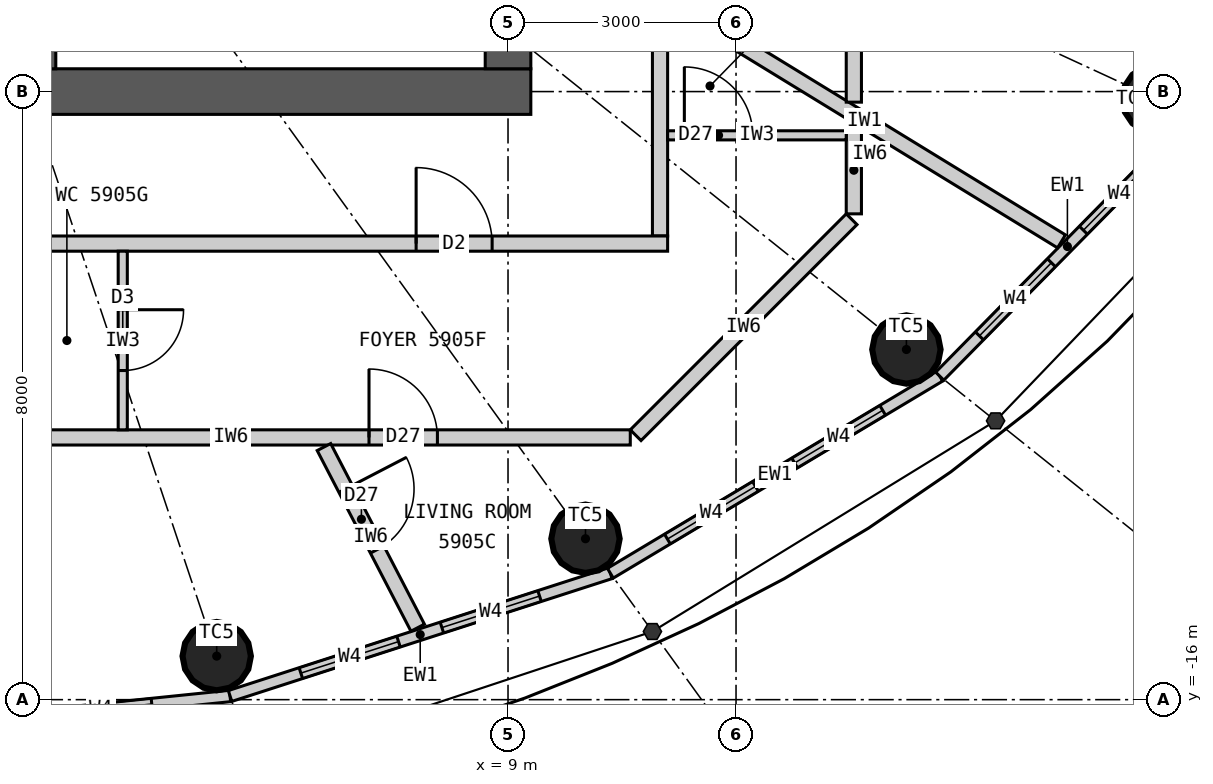
"""IFC4 building model, lengths in metres.
Left out: names, types, materials, properties, quantities, classifications, styles, units other than length and angle.
Written with IfcOpenShell. Run it as: python <this file> out.ifc"""

import sys

from ifc_helpers import new_model, si_unit, direction, frame, frame_2d, origin, origin_2d, place, context, subcontext, project, spatial, rectangle, circle, extrude, element, fill, save


model = new_model("IFC4")
c1 = context("Model", 3, precision=1e-05, world=origin(), true_north=direction((0.0, 1.0)))
c2 = subcontext(c1, "Body", "Model", "MODEL_VIEW")
j1 = project(units=[si_unit("LENGTHUNIT", "METRE"), si_unit("PLANEANGLEUNIT", "RADIAN")], contexts=[c1])
p1 = place(None, origin())
s1 = spatial("IfcSite", under=j1, at=p1, CompositionType="ELEMENT")
p2 = place(p1, origin())
s2 = spatial("IfcBuilding", under=s1, at=p2, CompositionType="ELEMENT")
p3 = place(p2, frame((0.0, 0.0, 219.3)))
s3 = spatial("IfcBuildingStorey", under=s2, at=p3, CompositionType="ELEMENT", Elevation=219.3)
for number, where, z_axis, x_axis in (
    (1, (5.167, -15.427, 0.0), (0.0, 0.0, 1.0), (1.0, 0.0, 0.0)),
    (2, (10.019, -13.883, 0.0), (0.0, 0.0, 1.0), (1.0, 0.0, 0.0)),
    (3, (14.241, -11.393, 0.0), (0.0, 0.0, 1.0), (1.0, 0.0, 0.0)),
    (4, (17.532, -8.098, 0.0), (0.0, 0.0, 1.0), (1.0, 0.0, 0.0)),
):
    element("IfcColumn", number, at=place(p3, frame(where, z_axis=z_axis, x_axis=x_axis)), inside=s3, PredefinedType="COLUMN", context=c2, shape_type="SweptSolid", body=[
        extrude(circle(Radius=0.45, at=origin_2d()), origin(), (0.0, 0.0, 1.0), 3.3),
    ])
p4 = place(p3, frame((9.3, -8.0, 0.0), z_axis=(0.0, 0.0, 1.0), x_axis=(-1.0, 0.0, 0.0)))
e5 = element("IfcWall", 5, at=p4, inside=s3, PredefinedType="SHEAR", context=c2, shape_type="SweptSolid", body=[
    extrude(rectangle(XDim=18.6, YDim=0.6, at=frame_2d((9.3, 0.0))), origin(), (0.0, 0.0, 1.0), 3.3),
])
p5 = place(p4, frame((8.0, 0.0, 0.0)))
e6 = element("IfcOpeningElement", 6, at=p5, cuts=e5, PredefinedType="OPENING", context=c2, shape_type="SweptSolid", body=[
    extrude(rectangle(XDim=1.2, YDim=2.2, at=frame_2d((0.6, 1.1))), frame((0.0, 0.31, 0.0), z_axis=(0.0, -1.0, 0.0), x_axis=(1.0, 0.0, 0.0)), (0.0, 0.0, 1.0), 0.62),
])
p6 = place(p4, frame((15.6, 0.0, 0.0)))
e7 = element("IfcOpeningElement", 7, at=p6, cuts=e5, PredefinedType="OPENING", context=c2, shape_type="SweptSolid", body=[
    extrude(rectangle(XDim=0.9, YDim=2.2, at=frame_2d((0.45, 1.1))), frame((0.0, 0.31, 0.0), z_axis=(0.0, -1.0, 0.0), x_axis=(1.0, 0.0, 0.0)), (0.0, 0.0, 1.0), 0.62),
])
p7 = place(p3, frame((9.0, -7.7, 0.0), z_axis=(0.0, 0.0, 1.0), x_axis=(0.0, 1.0, 0.0)))
e8 = element("IfcWall", 8, at=p7, inside=s3, PredefinedType="SHEAR", context=c2, shape_type="SweptSolid", body=[
    extrude(rectangle(XDim=15.4, YDim=0.6, at=frame_2d((7.7, 0.0))), origin(), (0.0, 0.0, 1.0), 3.3),
])
p8 = place(p7, frame((6.8, 0.0, 0.0)))
e9 = element("IfcOpeningElement", 9, at=p8, cuts=e8, PredefinedType="OPENING", context=c2, shape_type="SweptSolid", body=[
    extrude(rectangle(XDim=1.8, YDim=2.2, at=frame_2d((0.9, 1.1))), frame((0.0, 0.31, 0.0), z_axis=(0.0, -1.0, 0.0), x_axis=(1.0, 0.0, 0.0)), (0.0, 0.0, 1.0), 0.62),
])
p9 = place(p3, frame((2.75, -7.7, 0.0), z_axis=(0.0, 0.0, 1.0), x_axis=(0.0, 1.0, 0.0)))
e10 = element("IfcWall", 10, at=p9, inside=s3, PredefinedType="SHEAR", context=c2, shape_type="SweptSolid", body=[
    extrude(rectangle(XDim=3.2, YDim=0.6, at=frame_2d((1.6, 0.0))), origin(), (0.0, 0.0, 1.0), 3.3),
])
p10 = place(p9, frame((1.175, 0.0, 0.0)))
e11 = element("IfcOpeningElement", 11, at=p10, cuts=e10, PredefinedType="OPENING", context=c2, shape_type="SweptSolid", body=[
    extrude(rectangle(XDim=1.1, YDim=2.2, at=frame_2d((0.55, 1.1))), frame((0.0, 0.31, 0.0), z_axis=(0.0, -1.0, 0.0), x_axis=(1.0, 0.0, 0.0)), (0.0, 0.0, 1.0), 0.62),
])
p11 = place(p3, frame((0.0, -16.5, 0.0), z_axis=(0.0, 0.0, 1.0), x_axis=(0.994774574972, 0.102095763818, 0.0)))
e12 = element("IfcWall", 12, at=p11, inside=s3, PredefinedType="ELEMENTEDWALL", context=c2, shape_type="SweptSolid", body=[
    extrude(rectangle(XDim=5.371, YDim=0.15, at=frame_2d((2.686, 0.0))), origin(), (0.0, 0.0, 1.0), 3.12),
])
p12 = place(p11, frame((1.035, 0.0, 0.9)))
e13 = element("IfcOpeningElement", 13, at=p12, cuts=e12, PredefinedType="OPENING", context=c2, shape_type="SweptSolid", body=[
    extrude(rectangle(XDim=1.35, YDim=1.9, at=frame_2d((0.675, 0.95))), frame((0.0, 0.085, 0.0), z_axis=(0.0, -1.0, 0.0), x_axis=(1.0, 0.0, 0.0)), (0.0, 0.0, 1.0), 0.17),
])
p13 = place(p11, frame((2.985, 0.0, 0.9)))
e14 = element("IfcOpeningElement", 14, at=p13, cuts=e12, PredefinedType="OPENING", context=c2, shape_type="SweptSolid", body=[
    extrude(rectangle(XDim=1.35, YDim=1.9, at=frame_2d((0.675, 0.95))), frame((0.0, 0.085, 0.0), z_axis=(0.0, -1.0, 0.0), x_axis=(1.0, 0.0, 0.0)), (0.0, 0.0, 1.0), 0.17),
])
p14 = place(p3, frame((5.343, -15.952, 0.0), z_axis=(0.0, 0.0, 1.0), x_axis=(0.951644702515, 0.307200846638, 0.0)))
e15 = element("IfcWall", 15, at=p14, inside=s3, PredefinedType="ELEMENTEDWALL", context=c2, shape_type="SweptSolid", body=[
    extrude(rectangle(XDim=5.258, YDim=0.15, at=frame_2d((2.629, 0.0))), origin(), (0.0, 0.0, 1.0), 3.12),
])
p15 = place(p14, frame((0.979, 0.0, 0.9)))
e16 = element("IfcOpeningElement", 16, at=p15, cuts=e15, PredefinedType="OPENING", context=c2, shape_type="SweptSolid", body=[
    extrude(rectangle(XDim=1.35, YDim=1.9, at=frame_2d((0.675, 0.95))), frame((0.0, 0.085, 0.0), z_axis=(0.0, -1.0, 0.0), x_axis=(1.0, 0.0, 0.0)), (0.0, 0.0, 1.0), 0.17),
])
p16 = place(p14, frame((2.929, 0.0, 0.9)))
e17 = element("IfcOpeningElement", 17, at=p16, cuts=e15, PredefinedType="OPENING", context=c2, shape_type="SweptSolid", body=[
    extrude(rectangle(XDim=1.35, YDim=1.9, at=frame_2d((0.675, 0.95))), frame((0.0, 0.085, 0.0), z_axis=(0.0, -1.0, 0.0), x_axis=(1.0, 0.0, 0.0)), (0.0, 0.0, 1.0), 0.17),
])
p17 = place(p3, frame((10.346, -14.336, 0.0), z_axis=(0.0, 0.0, 1.0), x_axis=(0.85822150553, 0.513279502265, 0.0)))
e18 = element("IfcWall", 18, at=p17, inside=s3, PredefinedType="ELEMENTEDWALL", context=c2, shape_type="SweptSolid", body=[
    extrude(rectangle(XDim=5.05, YDim=0.15, at=frame_2d((2.525, 0.0))), origin(), (0.0, 0.0, 1.0), 3.12),
])
p18 = place(p17, frame((0.875, 0.0, 0.9)))
e19 = element("IfcOpeningElement", 19, at=p18, cuts=e18, PredefinedType="OPENING", context=c2, shape_type="SweptSolid", body=[
    extrude(rectangle(XDim=1.35, YDim=1.9, at=frame_2d((0.675, 0.95))), frame((0.0, 0.085, 0.0), z_axis=(0.0, -1.0, 0.0), x_axis=(1.0, 0.0, 0.0)), (0.0, 0.0, 1.0), 0.17),
])
p19 = place(p17, frame((2.825, 0.0, 0.9)))
e20 = element("IfcOpeningElement", 20, at=p19, cuts=e18, PredefinedType="OPENING", context=c2, shape_type="SweptSolid", body=[
    extrude(rectangle(XDim=1.35, YDim=1.9, at=frame_2d((0.675, 0.95))), frame((0.0, 0.085, 0.0), z_axis=(0.0, -1.0, 0.0), x_axis=(1.0, 0.0, 0.0)), (0.0, 0.0, 1.0), 0.17),
])
p20 = place(p3, frame((14.68, -11.744, 0.0), z_axis=(0.0, 0.0, 1.0), x_axis=(0.701527379618, 0.712642501993, 0.0)))
e21 = element("IfcWall", 21, at=p20, inside=s3, PredefinedType="ELEMENTEDWALL", context=c2, shape_type="SweptSolid", body=[
    extrude(rectangle(XDim=4.788, YDim=0.15, at=frame_2d((2.394, 0.0))), origin(), (0.0, 0.0, 1.0), 3.12),
])
p21 = place(p20, frame((0.744, 0.0, 0.9)))
e22 = element("IfcOpeningElement", 22, at=p21, cuts=e21, PredefinedType="OPENING", context=c2, shape_type="SweptSolid", body=[
    extrude(rectangle(XDim=1.35, YDim=1.9, at=frame_2d((0.675, 0.95))), frame((0.0, 0.085, 0.0), z_axis=(0.0, -1.0, 0.0), x_axis=(1.0, 0.0, 0.0)), (0.0, 0.0, 1.0), 0.17),
])
p22 = place(p20, frame((2.694, 0.0, 0.9)))
e23 = element("IfcOpeningElement", 23, at=p22, cuts=e21, PredefinedType="OPENING", context=c2, shape_type="SweptSolid", body=[
    extrude(rectangle(XDim=1.35, YDim=1.9, at=frame_2d((0.675, 0.95))), frame((0.0, 0.085, 0.0), z_axis=(0.0, -1.0, 0.0), x_axis=(1.0, 0.0, 0.0)), (0.0, 0.0, 1.0), 0.17),
])
p23 = place(p3, frame((11.0, -9.9, 0.0), z_axis=(0.0, 0.0, 1.0), x_axis=(0.0, 1.0, 0.0)))
e24 = element("IfcWall", 24, at=p23, inside=s3, PredefinedType="PARTITIONING", context=c2, shape_type="SweptSolid", body=[
    extrude(rectangle(XDim=7.416, YDim=0.2, at=frame_2d((3.708, 0.0))), origin(), (0.0, 0.0, 1.0), 3.12),
])
p24 = place(p3, frame((11.1, -10.0, 0.0), z_axis=(0.0, 0.0, 1.0), x_axis=(-1.0, 0.0, 0.0)))
e25 = element("IfcWall", 25, at=p24, inside=s3, PredefinedType="PARTITIONING", context=c2, shape_type="SweptSolid", body=[
    extrude(rectangle(XDim=22.2, YDim=0.2, at=frame_2d((11.1, 0.0))), origin(), (0.0, 0.0, 1.0), 3.12),
])
p25 = place(p24, frame((18.864, 0.0, 0.0)))
e26 = element("IfcOpeningElement", 26, at=p25, cuts=e25, PredefinedType="OPENING", context=c2, shape_type="SweptSolid", body=[
    extrude(rectangle(XDim=1.0, YDim=2.2, at=frame_2d((0.5, 1.1))), frame((0.0, 0.11, 0.0), z_axis=(0.0, -1.0, 0.0), x_axis=(1.0, 0.0, 0.0)), (0.0, 0.0, 1.0), 0.22),
])
p26 = place(p24, frame((2.309, 0.0, 0.0)))
e27 = element("IfcOpeningElement", 27, at=p26, cuts=e25, PredefinedType="OPENING", context=c2, shape_type="SweptSolid", body=[
    extrude(rectangle(XDim=1.0, YDim=2.2, at=frame_2d((0.5, 1.1))), frame((0.0, 0.11, 0.0), z_axis=(0.0, -1.0, 0.0), x_axis=(1.0, 0.0, 0.0)), (0.0, 0.0, 1.0), 0.22),
])
p27 = place(p3, frame((11.1, -6.797, 0.0), z_axis=(0.0, 0.0, 1.0), x_axis=(0.852799818179, -0.522237943963, 0.0)))
e28 = element("IfcWall", 28, at=p27, inside=s3, PredefinedType="PARTITIONING", context=c2, shape_type="SweptSolid", body=[
    extrude(rectangle(XDim=6.077, YDim=0.2, at=frame_2d((3.039, 0.0))), origin(), (0.0, 0.0, 1.0), 3.12),
])
p28 = place(p3, frame((0.101, -12.55, 0.0), z_axis=(0.0, 0.0, 1.0), x_axis=(1.0, 0.0, 0.0)))
e29 = element("IfcWall", 29, at=p28, inside=s3, PredefinedType="PARTITIONING", context=c2, shape_type="SweptSolid", body=[
    extrude(rectangle(XDim=10.508, YDim=0.2, at=frame_2d((5.254, 0.0))), origin(), (0.0, 0.0, 1.0), 3.12),
])
p29 = place(p28, frame((1.4, 0.0, 0.0)))
e30 = element("IfcOpeningElement", 30, at=p29, cuts=e29, PredefinedType="OPENING", context=c2, shape_type="SweptSolid", body=[
    extrude(rectangle(XDim=0.8, YDim=2.1, at=frame_2d((0.4, 1.05))), frame((0.0, 0.11, 0.0), z_axis=(0.0, -1.0, 0.0), x_axis=(1.0, 0.0, 0.0)), (0.0, 0.0, 1.0), 0.22),
])
p30 = place(p28, frame((7.07, 0.0, 0.0)))
e31 = element("IfcOpeningElement", 31, at=p30, cuts=e29, PredefinedType="OPENING", context=c2, shape_type="SweptSolid", body=[
    extrude(rectangle(XDim=0.9, YDim=2.1, at=frame_2d((0.45, 1.05))), frame((0.0, 0.11, 0.0), z_axis=(0.0, -1.0, 0.0), x_axis=(1.0, 0.0, 0.0)), (0.0, 0.0, 1.0), 0.22),
])
p31 = place(p3, frame((10.679, -12.521, 0.0), z_axis=(0.0, 0.0, 1.0), x_axis=(0.707106781187, 0.707106781187, 0.0)))
e32 = element("IfcWall", 32, at=p31, inside=s3, PredefinedType="PARTITIONING", context=c2, shape_type="SweptSolid", body=[
    extrude(rectangle(XDim=4.019, YDim=0.2, at=frame_2d((2.009, 0.0))), origin(), (0.0, 0.0, 1.0), 3.12),
])
p32 = place(p3, frame((13.55, -9.609, 0.0), z_axis=(0.0, 0.0, 1.0), x_axis=(0.0, 1.0, 0.0)))
e33 = element("IfcWall", 33, at=p32, inside=s3, PredefinedType="PARTITIONING", context=c2, shape_type="SweptSolid", body=[
    extrude(rectangle(XDim=1.148, YDim=0.2, at=frame_2d((0.574, 0.0))), origin(), (0.0, 0.0, 1.0), 3.12),
])
p33 = place(p3, frame((6.578, -12.677, 0.0), z_axis=(0.0, 0.0, 1.0), x_axis=(0.460620531465, -0.887597164255, 0.0)))
e34 = element("IfcWall", 34, at=p33, inside=s3, PredefinedType="PARTITIONING", context=c2, shape_type="SweptSolid", body=[
    extrude(rectangle(XDim=2.678, YDim=0.2, at=frame_2d((1.339, 0.0))), origin(), (0.0, 0.0, 1.0), 3.12),
])
p34 = place(p33, frame((0.62, 0.0, 0.0)))
e35 = element("IfcOpeningElement", 35, at=p34, cuts=e34, PredefinedType="OPENING", context=c2, shape_type="SweptSolid", body=[
    extrude(rectangle(XDim=0.9, YDim=2.1, at=frame_2d((0.45, 1.05))), frame((0.0, 0.11, 0.0), z_axis=(0.0, -1.0, 0.0), x_axis=(1.0, 0.0, 0.0)), (0.0, 0.0, 1.0), 0.22),
])
p35 = place(p3, frame((3.931, -10.1, 0.0), z_axis=(0.0, 0.0, 1.0), x_axis=(0.0, -1.0, 0.0)))
e36 = element("IfcWall", 36, at=p35, inside=s3, PredefinedType="PARTITIONING", context=c2, shape_type="SweptSolid", body=[
    extrude(rectangle(XDim=2.35, YDim=0.12, at=frame_2d((1.175, 0.0))), origin(), (0.0, 0.0, 1.0), 3.12),
])
p36 = place(p35, frame((0.77, 0.0, 0.0)))
e37 = element("IfcOpeningElement", 37, at=p36, cuts=e36, PredefinedType="OPENING", context=c2, shape_type="SweptSolid", body=[
    extrude(rectangle(XDim=0.8, YDim=2.1, at=frame_2d((0.4, 1.05))), frame((0.0, 0.07, 0.0), z_axis=(0.0, -1.0, 0.0), x_axis=(1.0, 0.0, 0.0)), (0.0, 0.0, 1.0), 0.14),
])
p37 = place(p3, frame((11.1, -8.576, 0.0), z_axis=(0.0, 0.0, 1.0), x_axis=(1.0, 0.0, 0.0)))
e38 = element("IfcWall", 38, at=p37, inside=s3, PredefinedType="PARTITIONING", context=c2, shape_type="SweptSolid", body=[
    extrude(rectangle(XDim=2.35, YDim=0.12, at=frame_2d((1.175, 0.0))), origin(), (0.0, 0.0, 1.0), 3.12),
])
p38 = place(p37, frame((0.22, 0.0, 0.0)))
e39 = element("IfcOpeningElement", 39, at=p38, cuts=e38, PredefinedType="OPENING", context=c2, shape_type="SweptSolid", body=[
    extrude(rectangle(XDim=0.9, YDim=2.1, at=frame_2d((0.45, 1.05))), frame((0.0, 0.07, 0.0), z_axis=(0.0, -1.0, 0.0), x_axis=(1.0, 0.0, 0.0)), (0.0, 0.0, 1.0), 0.14),
])
p39 = place(p3, frame((13.55, -8.139, 0.0), z_axis=(0.0, 0.0, 1.0), x_axis=(0.0, 1.0, 0.0)))
e40 = element("IfcWall", 40, at=p39, inside=s3, PredefinedType="PARTITIONING", context=c2, shape_type="SweptSolid", body=[
    extrude(rectangle(XDim=12.496, YDim=0.2, at=frame_2d((6.248, 0.0))), origin(), (0.0, 0.0, 1.0), 3.12),
])
p40 = place(p39, frame((2.42, 0.0, 0.0)))
e41 = element("IfcOpeningElement", 41, at=p40, cuts=e40, PredefinedType="OPENING", context=c2, shape_type="SweptSolid", body=[
    extrude(rectangle(XDim=0.8, YDim=2.1, at=frame_2d((0.4, 1.05))), frame((0.0, 0.11, 0.0), z_axis=(0.0, -1.0, 0.0), x_axis=(1.0, 0.0, 0.0)), (0.0, 0.0, 1.0), 0.22),
])
p41 = place(p39, frame((9.776, 0.0, 0.0)))
e42 = element("IfcOpeningElement", 42, at=p41, cuts=e40, PredefinedType="OPENING", context=c2, shape_type="SweptSolid", body=[
    extrude(rectangle(XDim=0.8, YDim=2.1, at=frame_2d((0.4, 1.05))), frame((0.0, 0.11, 0.0), z_axis=(0.0, -1.0, 0.0), x_axis=(1.0, 0.0, 0.0)), (0.0, 0.0, 1.0), 0.22),
])
p42 = place(p39, frame((5.82, 0.0, 0.0)))
e43 = element("IfcOpeningElement", 43, at=p42, cuts=e40, PredefinedType="OPENING", context=c2, shape_type="SweptSolid", body=[
    extrude(rectangle(XDim=0.9, YDim=2.1, at=frame_2d((0.45, 1.05))), frame((0.0, 0.11, 0.0), z_axis=(0.0, -1.0, 0.0), x_axis=(1.0, 0.0, 0.0)), (0.0, 0.0, 1.0), 0.22),
])
p43 = place(p13, origin())
e44 = element("IfcWindow", 44, at=p43, inside=s3, PartitioningType="SINGLE_PANEL", PredefinedType="WINDOW", context=c2, shape_type="SweptSolid", body=[
    extrude(rectangle(XDim=1.35, YDim=1.9, at=frame_2d((0.675, 0.95))), frame((0.0, 0.03, 0.0), z_axis=(0.0, -1.0, 0.0), x_axis=(1.0, 0.0, 0.0)), (0.0, 0.0, 1.0), 0.06),
])
fill(e14, e44)
p44 = place(p15, origin())
e45 = element("IfcWindow", 45, at=p44, inside=s3, PartitioningType="SINGLE_PANEL", PredefinedType="WINDOW", context=c2, shape_type="SweptSolid", body=[
    extrude(rectangle(XDim=1.35, YDim=1.9, at=frame_2d((0.675, 0.95))), frame((0.0, 0.03, 0.0), z_axis=(0.0, -1.0, 0.0), x_axis=(1.0, 0.0, 0.0)), (0.0, 0.0, 1.0), 0.06),
])
fill(e16, e45)
p45 = place(p16, origin())
e46 = element("IfcWindow", 46, at=p45, inside=s3, PartitioningType="SINGLE_PANEL", PredefinedType="WINDOW", context=c2, shape_type="SweptSolid", body=[
    extrude(rectangle(XDim=1.35, YDim=1.9, at=frame_2d((0.675, 0.95))), frame((0.0, 0.03, 0.0), z_axis=(0.0, -1.0, 0.0), x_axis=(1.0, 0.0, 0.0)), (0.0, 0.0, 1.0), 0.06),
])
fill(e17, e46)
p46 = place(p18, origin())
e47 = element("IfcWindow", 47, at=p46, inside=s3, PartitioningType="SINGLE_PANEL", PredefinedType="WINDOW", context=c2, shape_type="SweptSolid", body=[
    extrude(rectangle(XDim=1.35, YDim=1.9, at=frame_2d((0.675, 0.95))), frame((0.0, 0.03, 0.0), z_axis=(0.0, -1.0, 0.0), x_axis=(1.0, 0.0, 0.0)), (0.0, 0.0, 1.0), 0.06),
])
fill(e19, e47)
p47 = place(p19, origin())
e48 = element("IfcWindow", 48, at=p47, inside=s3, PartitioningType="SINGLE_PANEL", PredefinedType="WINDOW", context=c2, shape_type="SweptSolid", body=[
    extrude(rectangle(XDim=1.35, YDim=1.9, at=frame_2d((0.675, 0.95))), frame((0.0, 0.03, 0.0), z_axis=(0.0, -1.0, 0.0), x_axis=(1.0, 0.0, 0.0)), (0.0, 0.0, 1.0), 0.06),
])
fill(e20, e48)
p48 = place(p21, origin())
e49 = element("IfcWindow", 49, at=p48, inside=s3, PartitioningType="SINGLE_PANEL", PredefinedType="WINDOW", context=c2, shape_type="SweptSolid", body=[
    extrude(rectangle(XDim=1.35, YDim=1.9, at=frame_2d((0.675, 0.95))), frame((0.0, 0.03, 0.0), z_axis=(0.0, -1.0, 0.0), x_axis=(1.0, 0.0, 0.0)), (0.0, 0.0, 1.0), 0.06),
])
fill(e22, e49)
p49 = place(p22, origin())
e50 = element("IfcWindow", 50, at=p49, inside=s3, PartitioningType="SINGLE_PANEL", PredefinedType="WINDOW", context=c2, shape_type="SweptSolid", body=[
    extrude(rectangle(XDim=1.35, YDim=1.9, at=frame_2d((0.675, 0.95))), frame((0.0, 0.03, 0.0), z_axis=(0.0, -1.0, 0.0), x_axis=(1.0, 0.0, 0.0)), (0.0, 0.0, 1.0), 0.06),
])
fill(e23, e50)
p50 = place(p26, origin())
e51 = element("IfcDoor", 51, at=p50, inside=s3, OperationType="SINGLE_SWING_RIGHT", PredefinedType="DOOR", context=c2, shape_type="SweptSolid", body=[
    extrude(rectangle(XDim=1.0, YDim=2.2, at=frame_2d((0.5, 1.1))), frame((0.0, 0.025, 0.0), z_axis=(0.0, -1.0, 0.0), x_axis=(1.0, 0.0, 0.0)), (0.0, 0.0, 1.0), 0.05),
])
fill(e27, e51)
p51 = place(p36, origin())
e52 = element("IfcDoor", 52, at=p51, inside=s3, OperationType="SINGLE_SWING_LEFT", PredefinedType="DOOR", context=c2, shape_type="SweptSolid", body=[
    extrude(rectangle(XDim=0.8, YDim=2.1, at=frame_2d((0.4, 1.05))), frame((0.0, 0.025, 0.0), z_axis=(0.0, -1.0, 0.0), x_axis=(1.0, 0.0, 0.0)), (0.0, 0.0, 1.0), 0.05),
])
fill(e37, e52)
p52 = place(p38, origin())
e53 = element("IfcDoor", 53, at=p52, inside=s3, OperationType="SINGLE_SWING_LEFT", PredefinedType="DOOR", context=c2, shape_type="SweptSolid", body=[
    extrude(rectangle(XDim=0.9, YDim=2.1, at=frame_2d((0.45, 1.05))), frame((0.0, 0.025, 0.0), z_axis=(0.0, -1.0, 0.0), x_axis=(1.0, 0.0, 0.0)), (0.0, 0.0, 1.0), 0.05),
])
fill(e39, e53)
p53 = place(p30, origin())
e54 = element("IfcDoor", 54, at=p53, inside=s3, OperationType="SINGLE_SWING_LEFT", PredefinedType="DOOR", context=c2, shape_type="SweptSolid", body=[
    extrude(rectangle(XDim=0.9, YDim=2.1, at=frame_2d((0.45, 1.05))), frame((0.0, 0.025, 0.0), z_axis=(0.0, -1.0, 0.0), x_axis=(1.0, 0.0, 0.0)), (0.0, 0.0, 1.0), 0.05),
])
fill(e31, e54)
p54 = place(p34, origin())
e55 = element("IfcDoor", 55, at=p54, inside=s3, OperationType="SINGLE_SWING_LEFT", PredefinedType="DOOR", context=c2, shape_type="SweptSolid", body=[
    extrude(rectangle(XDim=0.9, YDim=2.1, at=frame_2d((0.45, 1.05))), frame((0.0, 0.025, 0.0), z_axis=(0.0, -1.0, 0.0), x_axis=(1.0, 0.0, 0.0)), (0.0, 0.0, 1.0), 0.05),
])
fill(e35, e55)
save(model, sys.argv[1])
